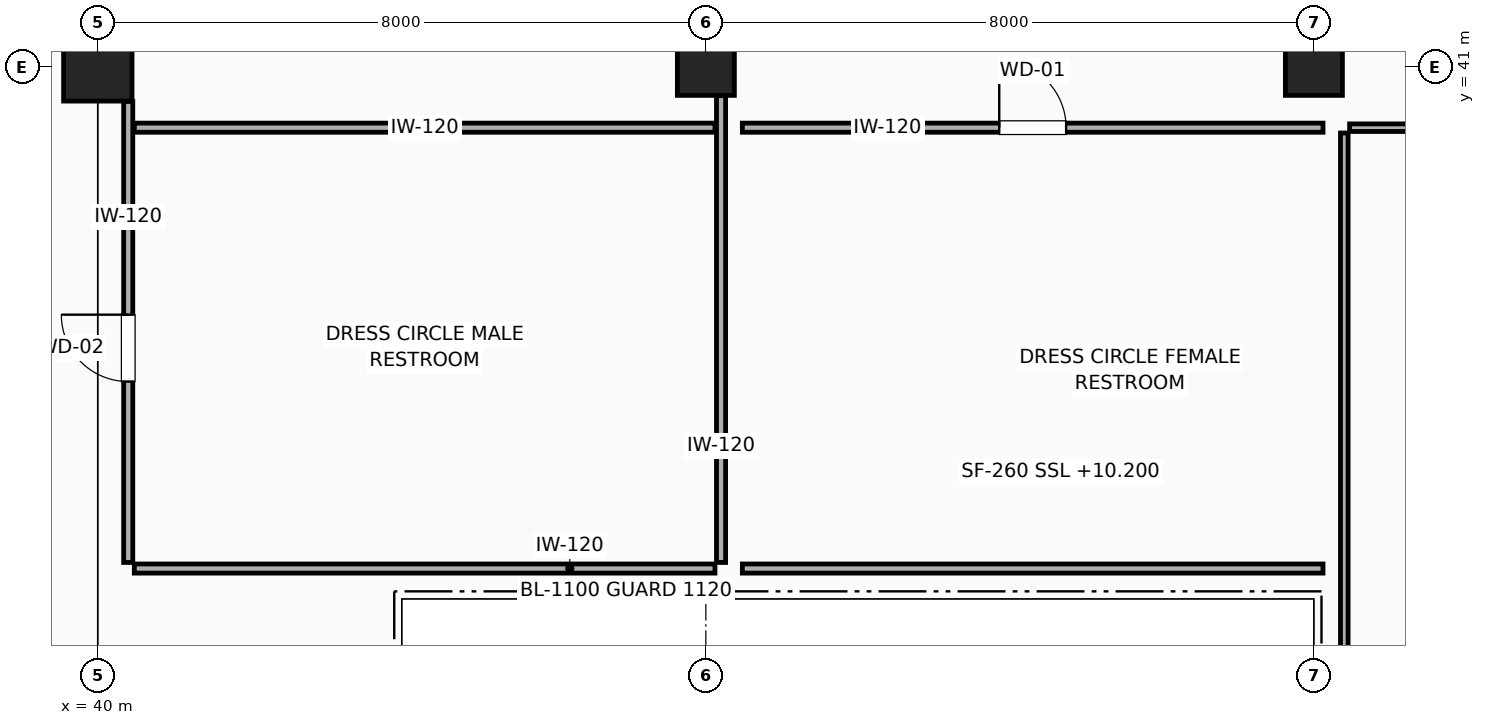
"""IFC4 building model, lengths in metres.
Left out: names, types, materials, properties, quantities, classifications, styles, units other than length and angle.
Written with IfcOpenShell. Run it as: python <this file> out.ifc"""

import sys

from ifc_helpers import new_model, si_unit, direction, frame, frame_2d, origin, origin_2d, place, context, subcontext, project, spatial, rectangle, extrude, element, fill, save


model = new_model("IFC4")
c1 = context("Model", 3, precision=1e-05, world=origin(), true_north=direction((0.0, 1.0)))
c2 = subcontext(c1, "Body", "Model", "MODEL_VIEW")
j1 = project(units=[si_unit("LENGTHUNIT", "METRE"), si_unit("PLANEANGLEUNIT", "RADIAN")], contexts=[c1])
p1 = place(None, origin())
s1 = spatial("IfcSite", under=j1, at=p1, CompositionType="ELEMENT")
p2 = place(p1, origin())
s2 = spatial("IfcBuilding", under=s1, at=p2, CompositionType="ELEMENT")
p3 = place(p2, frame((0.0, 0.0, 10.2)))
s3 = spatial("IfcBuildingStorey", under=s2, at=p3, CompositionType="ELEMENT", Elevation=10.2)
p4 = place(p3, frame((40.0, 41.0, 0.0), z_axis=(0.0, 0.0, 1.0), x_axis=(1.0, 0.0, 0.0)))
e1 = element("IfcColumn", 1, at=p4, inside=s3, PredefinedType="COLUMN", context=c2, shape_type="SweptSolid", body=[
    extrude(rectangle(XDim=0.9, YDim=0.9, at=origin_2d()), origin(), (0.0, 0.0, 1.0), 4.8),
])
for number, where, z_axis, x_axis in (
    (2, (48.0, 41.0, 0.0), (0.0, 0.0, 1.0), (1.0, 0.0, 0.0)),
    (3, (56.0, 41.0, 0.0), (0.0, 0.0, 1.0), (1.0, 0.0, 0.0)),
):
    element("IfcColumn", number, at=place(p3, frame(where, z_axis=z_axis, x_axis=x_axis)), inside=s3, PredefinedType="COLUMN", context=c2, shape_type="SweptSolid", body=[
        extrude(rectangle(XDim=0.75, YDim=0.75, at=origin_2d()), origin(), (0.0, 0.0, 1.0), 4.8),
    ])
p5 = place(p3, frame((56.47, 40.2, 0.0), z_axis=(0.0, 0.0, 1.0), x_axis=(1.0, 0.0, 0.0)))
e4 = element("IfcWall", 4, at=p5, inside=s3, PredefinedType="PARTITIONING", context=c2, shape_type="SweptSolid", body=[
    extrude(rectangle(XDim=1.91, YDim=0.1, at=frame_2d((0.955, 0.0))), origin(), (0.0, 0.0, 1.0), 4.53),
])
p6 = place(p3, frame((56.4, 32.39, 0.0), z_axis=(0.0, 0.0, 1.0), x_axis=(0.0, 1.0, 0.0)))
e5 = element("IfcWall", 5, at=p6, inside=s3, PredefinedType="PARTITIONING", context=c2, shape_type="SweptSolid", body=[
    extrude(rectangle(XDim=7.74, YDim=0.1, at=frame_2d((3.87, 0.0))), origin(), (0.0, 0.0, 1.0), 4.53),
])
p7 = place(p3, frame((40.48, 40.2, 0.0), z_axis=(0.0, 0.0, 1.0), x_axis=(1.0, 0.0, 0.0)))
e6 = element("IfcWall", 6, at=p7, inside=s3, PredefinedType="PARTITIONING", context=c2, shape_type="SweptSolid", body=[
    extrude(rectangle(XDim=7.64, YDim=0.12, at=frame_2d((3.82, 0.0))), origin(), (0.0, 0.0, 1.0), 4.53),
])
p8 = place(p3, frame((48.2, 40.621, 0.0), z_axis=(0.0, 0.0, 1.0), x_axis=(0.0, -1.0, 0.0)))
e7 = element("IfcWall", 7, at=p8, inside=s3, PredefinedType="PARTITIONING", context=c2, shape_type="SweptSolid", body=[
    extrude(rectangle(XDim=6.141, YDim=0.12, at=frame_2d((3.071, 0.0))), origin(), (0.0, 0.0, 1.0), 4.53),
])
p9 = place(p3, frame((48.12, 34.4, 0.0), z_axis=(0.0, 0.0, 1.0), x_axis=(-1.0, 0.0, 0.0)))
e8 = element("IfcWall", 8, at=p9, inside=s3, PredefinedType="PARTITIONING", context=c2, shape_type="SweptSolid", body=[
    extrude(rectangle(XDim=7.64, YDim=0.12, at=frame_2d((3.82, 0.0))), origin(), (0.0, 0.0, 1.0), 4.53),
])
p10 = place(p3, frame((40.4, 34.48, 0.0), z_axis=(0.0, 0.0, 1.0), x_axis=(0.0, 1.0, 0.0)))
e9 = element("IfcWall", 9, at=p10, inside=s3, PredefinedType="PARTITIONING", context=c2, shape_type="SweptSolid", body=[
    extrude(rectangle(XDim=6.066, YDim=0.12, at=frame_2d((3.033, 0.0))), origin(), (0.0, 0.0, 1.0), 4.53),
])
p11 = place(p10, frame((2.38, 0.0, 0.0)))
e10 = element("IfcOpeningElement", 10, at=p11, cuts=e9, PredefinedType="OPENING", context=c2, shape_type="SweptSolid", body=[
    extrude(rectangle(XDim=0.88, YDim=2.1, at=frame_2d((0.44, 1.05))), frame((0.0, 0.07, 0.0), z_axis=(0.0, -1.0, 0.0), x_axis=(1.0, 0.0, 0.0)), (0.0, 0.0, 1.0), 0.14),
])
p12 = place(p3, frame((48.48, 40.2, 0.0), z_axis=(0.0, 0.0, 1.0), x_axis=(1.0, 0.0, 0.0)))
e11 = element("IfcWall", 11, at=p12, inside=s3, PredefinedType="PARTITIONING", context=c2, shape_type="SweptSolid", body=[
    extrude(rectangle(XDim=7.64, YDim=0.12, at=frame_2d((3.82, 0.0))), origin(), (0.0, 0.0, 1.0), 4.53),
])
p13 = place(p12, frame((3.38, 0.0, 0.0)))
e12 = element("IfcOpeningElement", 12, at=p13, cuts=e11, PredefinedType="OPENING", context=c2, shape_type="SweptSolid", body=[
    extrude(rectangle(XDim=0.88, YDim=2.1, at=frame_2d((0.44, 1.05))), frame((0.0, 0.07, 0.0), z_axis=(0.0, -1.0, 0.0), x_axis=(1.0, 0.0, 0.0)), (0.0, 0.0, 1.0), 0.14),
])
p14 = place(p3, frame((56.12, 34.4, 0.0), z_axis=(0.0, 0.0, 1.0), x_axis=(-1.0, 0.0, 0.0)))
e13 = element("IfcWall", 13, at=p14, inside=s3, PredefinedType="PARTITIONING", context=c2, shape_type="SweptSolid", body=[
    extrude(rectangle(XDim=7.64, YDim=0.12, at=frame_2d((3.82, 0.0))), origin(), (0.0, 0.0, 1.0), 4.53),
])
p15 = place(p11, origin())
e14 = element("IfcDoor", 14, at=p15, inside=s3, OperationType="SINGLE_SWING_RIGHT", PredefinedType="DOOR", context=c2, shape_type="SweptSolid", body=[
    extrude(rectangle(XDim=0.88, YDim=2.1, at=frame_2d((0.44, 1.05))), frame((0.0, 0.025, 0.0), z_axis=(0.0, -1.0, 0.0), x_axis=(1.0, 0.0, 0.0)), (0.0, 0.0, 1.0), 0.05),
])
fill(e10, e14)
p16 = place(p13, origin())
e15 = element("IfcDoor", 15, at=p16, inside=s3, OperationType="SINGLE_SWING_LEFT", PredefinedType="DOOR", context=c2, shape_type="SweptSolid", body=[
    extrude(rectangle(XDim=0.88, YDim=2.1, at=frame_2d((0.44, 1.05))), frame((0.0, 0.025, 0.0), z_axis=(0.0, -1.0, 0.0), x_axis=(1.0, 0.0, 0.0)), (0.0, 0.0, 1.0), 0.05),
])
fill(e12, e15)
save(model, sys.argv[1])
